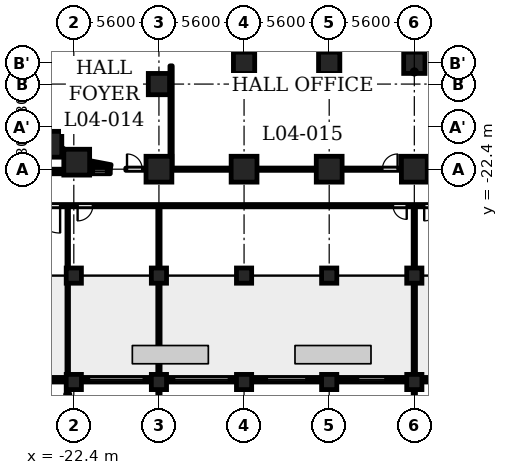
"""IFC4 building model, lengths in metres.
Left out: names, types, materials, properties, quantities, classifications, styles, units other than length and angle.
Written with IfcOpenShell. Run it as: python <this file> out.ifc"""

import sys

from ifc_helpers import new_model, si_unit, direction, frame, frame_2d, origin, origin_2d, place, context, subcontext, project, spatial, polyline, rectangle, circle, outline, extrude, element, fill, save


model = new_model("IFC4")
c1 = context("Model", 3, precision=1e-05, world=origin(), true_north=direction((0.0, 1.0)))
c2 = subcontext(c1, "Body", "Model", "MODEL_VIEW")
j1 = project(units=[si_unit("LENGTHUNIT", "METRE"), si_unit("PLANEANGLEUNIT", "RADIAN")], contexts=[c1])
p1 = place(None, origin())
s1 = spatial("IfcSite", under=j1, at=p1, CompositionType="ELEMENT")
p2 = place(p1, origin())
s2 = spatial("IfcBuilding", under=s1, at=p2, CompositionType="ELEMENT")
p3 = place(p2, frame((0.0, 0.0, 20.9)))
s3 = spatial("IfcBuildingStorey", under=s2, at=p3, CompositionType="ELEMENT", Elevation=20.9)
for number, where, z_axis, x_axis in (
    (1, (-22.209, -21.938, 0.0), (0.0, 0.0, 1.0), (1.0, 0.0, 0.0)),
    (2, (-16.8, -22.4, 0.0), (0.0, 0.0, 1.0), (1.0, 0.0, 0.0)),
    (3, (-11.2, -22.4, 0.0), (0.0, 0.0, 1.0), (1.0, 0.0, 0.0)),
    (4, (-5.6, -22.4, 0.0), (0.0, 0.0, 1.0), (1.0, 0.0, 0.0)),
    (5, (0.0, -22.4, 0.0), (0.0, 0.0, 1.0), (1.0, 0.0, 0.0)),
    (6, (-24.04, -20.76, 0.0), (0.0, 0.0, 1.0), (1.0, 0.0, 0.0)),
):
    element("IfcColumn", number, at=place(p3, frame(where, z_axis=z_axis, x_axis=x_axis)), inside=s3, PredefinedType="COLUMN", context=c2, shape_type="SweptSolid", body=[
        extrude(rectangle(XDim=1.7, YDim=1.7, at=origin_2d()), origin(), (0.0, 0.0, 1.0), 4.8),
    ])
for number, where, z_axis, x_axis in (
    (7, (-16.8, -16.8, 0.0), (0.0, 0.0, 1.0), (1.0, 0.0, 0.0)),
    (8, (-11.2, -15.4, 0.0), (0.0, 0.0, 1.0), (1.0, 0.0, 0.0)),
    (9, (-5.6, -15.4, 0.0), (0.0, 0.0, 1.0), (1.0, 0.0, 0.0)),
    (10, (0.0, -15.4, 0.0), (0.0, 0.0, 1.0), (1.0, 0.0, 0.0)),
):
    element("IfcColumn", number, at=place(p3, frame(where, z_axis=z_axis, x_axis=x_axis)), inside=s3, PredefinedType="COLUMN", context=c2, shape_type="SweptSolid", body=[
        extrude(rectangle(XDim=1.4, YDim=1.4, at=origin_2d()), origin(), (0.0, 0.0, 1.0), 4.8),
    ])
for number, where, z_axis, x_axis in (
    (11, (-22.4, -29.4, 0.0), (0.0, 0.0, 1.0), (1.0, 0.0, 0.0)),
    (12, (-16.8, -29.4, 0.0), (0.0, 0.0, 1.0), (1.0, 0.0, 0.0)),
    (13, (-11.2, -29.4, 0.0), (0.0, 0.0, 1.0), (1.0, 0.0, 0.0)),
    (14, (-5.6, -29.4, 0.0), (0.0, 0.0, 1.0), (1.0, 0.0, 0.0)),
    (15, (0.0, -29.4, 0.0), (0.0, 0.0, 1.0), (1.0, 0.0, 0.0)),
    (16, (-22.4, -36.4, 0.0), (0.0, 0.0, 1.0), (1.0, 0.0, 0.0)),
    (17, (-16.8, -36.4, 0.0), (0.0, 0.0, 1.0), (1.0, 0.0, 0.0)),
    (18, (-11.2, -36.4, 0.0), (0.0, 0.0, 1.0), (1.0, 0.0, 0.0)),
    (19, (-5.6, -36.4, 0.0), (0.0, 0.0, 1.0), (1.0, 0.0, 0.0)),
    (20, (0.0, -36.4, 0.0), (0.0, 0.0, 1.0), (1.0, 0.0, 0.0)),
):
    element("IfcColumn", number, at=place(p3, frame(where, z_axis=z_axis, x_axis=x_axis)), inside=s3, PredefinedType="COLUMN", context=c2, shape_type="SweptSolid", body=[
        extrude(circle(Radius=0.5, at=origin_2d()), origin(), (0.0, 0.0, 1.0), 4.8),
    ])
p4 = place(p3, frame((-23.244, -21.101, 0.0), z_axis=(0.0, 0.0, 1.0), x_axis=(0.827135885329, -0.562001981492, 0.0)))
e21 = element("IfcWall", 21, at=p4, inside=s3, PredefinedType="SOLIDWALL", context=c2, shape_type="SweptSolid", body=[
    extrude(rectangle(XDim=0.477, YDim=0.3, at=frame_2d((0.239, 0.0))), origin(), (0.0, 0.0, 1.0), 4.45),
])
p5 = place(p3, frame((-21.353, -21.989, 0.0), z_axis=(0.0, 0.0, 1.0), x_axis=(0.98229142023, -0.187359455971, 0.0)))
e22 = element("IfcWall", 22, at=p5, inside=s3, PredefinedType="SOLIDWALL", context=c2, shape_type="SweptSolid", body=[
    extrude(rectangle(XDim=1.406, YDim=0.3, at=frame_2d((0.703, 0.0))), origin(), (0.0, 0.0, 1.0), 3.55),
])
p6 = place(p3, frame((-20.0, -22.55, 0.0), z_axis=(0.0, 0.0, 1.0), x_axis=(-1.0, 0.0, 0.0)))
e23 = element("IfcWall", 23, at=p6, inside=s3, PredefinedType="SOLIDWALL", context=c2, shape_type="SweptSolid", body=[
    extrude(rectangle(XDim=1.359, YDim=0.3, at=frame_2d((0.679, 0.0))), origin(), (0.0, 0.0, 1.0), 3.55),
])
p7 = place(p6, frame((0.279, 0.0, 0.6)))
e24 = element("IfcOpeningElement", 24, at=p7, cuts=e23, PredefinedType="OPENING", context=c2, shape_type="SweptSolid", body=[
    extrude(rectangle(XDim=0.8, YDim=1.55, at=frame_2d((0.4, 0.775))), frame((0.0, 0.16, 0.0), z_axis=(0.0, -1.0, 0.0), x_axis=(1.0, 0.0, 0.0)), (0.0, 0.0, 1.0), 0.32),
])
p8 = place(p3, frame((-23.059, -22.55, 0.0), z_axis=(0.0, 0.0, 1.0), x_axis=(-1.0, 0.0, 0.0)))
e25 = element("IfcWall", 25, at=p8, inside=s3, PredefinedType="SOLIDWALL", context=c2, shape_type="SweptSolid", body=[
    extrude(rectangle(XDim=4.441, YDim=0.3, at=frame_2d((2.221, 0.0))), origin(), (0.0, 0.0, 1.0), 4.45),
])
p9 = place(p8, frame((1.621, 0.0, 0.6)))
e26 = element("IfcOpeningElement", 26, at=p9, cuts=e25, PredefinedType="OPENING", context=c2, shape_type="SweptSolid", body=[
    extrude(rectangle(XDim=1.2, YDim=1.55, at=frame_2d((0.6, 0.775))), frame((0.0, 0.16, 0.0), z_axis=(0.0, -1.0, 0.0), x_axis=(1.0, 0.0, 0.0)), (0.0, 0.0, 1.0), 0.32),
])
p10 = place(p3, frame((-27.5, -36.25, 0.0), z_axis=(0.0, 0.0, 1.0), x_axis=(1.0, 0.0, 0.0)))
e27 = element("IfcWall", 27, at=p10, inside=s3, PredefinedType="SOLIDWALL", context=c2, shape_type="SweptSolid", body=[
    extrude(rectangle(XDim=4.6, YDim=0.3, at=frame_2d((2.3, 0.0))), origin(), (0.0, 0.0, 1.0), 3.65),
])
p11 = place(p10, frame((1.0, 0.0, 0.9)))
e28 = element("IfcOpeningElement", 28, at=p11, cuts=e27, PredefinedType="OPENING", context=c2, shape_type="SweptSolid", body=[
    extrude(rectangle(XDim=2.6, YDim=1.25, at=frame_2d((1.3, 0.625))), frame((0.0, 0.16, 0.0), z_axis=(0.0, -1.0, 0.0), x_axis=(1.0, 0.0, 0.0)), (0.0, 0.0, 1.0), 0.32),
])
p12 = place(p3, frame((-21.9, -36.25, 0.0), z_axis=(0.0, 0.0, 1.0), x_axis=(1.0, 0.0, 0.0)))
e29 = element("IfcWall", 29, at=p12, inside=s3, PredefinedType="SOLIDWALL", context=c2, shape_type="SweptSolid", body=[
    extrude(rectangle(XDim=4.6, YDim=0.3, at=frame_2d((2.3, 0.0))), origin(), (0.0, 0.0, 1.0), 3.65),
])
p13 = place(p12, frame((0.5, 0.0, 1.2)))
e30 = element("IfcOpeningElement", 30, at=p13, cuts=e29, PredefinedType="OPENING", context=c2, shape_type="SweptSolid", body=[
    extrude(rectangle(XDim=3.6, YDim=0.95, at=frame_2d((1.8, 0.475))), frame((0.0, 0.16, 0.0), z_axis=(0.0, -1.0, 0.0), x_axis=(1.0, 0.0, 0.0)), (0.0, 0.0, 1.0), 0.32),
])
p14 = place(p3, frame((-16.3, -36.25, 0.0), z_axis=(0.0, 0.0, 1.0), x_axis=(1.0, 0.0, 0.0)))
e31 = element("IfcWall", 31, at=p14, inside=s3, PredefinedType="SOLIDWALL", context=c2, shape_type="SweptSolid", body=[
    extrude(rectangle(XDim=4.6, YDim=0.3, at=frame_2d((2.3, 0.0))), origin(), (0.0, 0.0, 1.0), 3.65),
])
p15 = place(p14, frame((0.5, 0.0, 1.2)))
e32 = element("IfcOpeningElement", 32, at=p15, cuts=e31, PredefinedType="OPENING", context=c2, shape_type="SweptSolid", body=[
    extrude(rectangle(XDim=3.6, YDim=0.95, at=frame_2d((1.8, 0.475))), frame((0.0, 0.16, 0.0), z_axis=(0.0, -1.0, 0.0), x_axis=(1.0, 0.0, 0.0)), (0.0, 0.0, 1.0), 0.32),
])
p16 = place(p3, frame((-10.7, -36.25, 0.0), z_axis=(0.0, 0.0, 1.0), x_axis=(1.0, 0.0, 0.0)))
e33 = element("IfcWall", 33, at=p16, inside=s3, PredefinedType="SOLIDWALL", context=c2, shape_type="SweptSolid", body=[
    extrude(rectangle(XDim=4.6, YDim=0.3, at=frame_2d((2.3, 0.0))), origin(), (0.0, 0.0, 1.0), 3.65),
])
p17 = place(p16, frame((1.0, 0.0, 0.9)))
e34 = element("IfcOpeningElement", 34, at=p17, cuts=e33, PredefinedType="OPENING", context=c2, shape_type="SweptSolid", body=[
    extrude(rectangle(XDim=2.6, YDim=1.25, at=frame_2d((1.3, 0.625))), frame((0.0, 0.16, 0.0), z_axis=(0.0, -1.0, 0.0), x_axis=(1.0, 0.0, 0.0)), (0.0, 0.0, 1.0), 0.32),
])
p18 = place(p3, frame((-5.1, -36.25, 0.0), z_axis=(0.0, 0.0, 1.0), x_axis=(1.0, 0.0, 0.0)))
e35 = element("IfcWall", 35, at=p18, inside=s3, PredefinedType="SOLIDWALL", context=c2, shape_type="SweptSolid", body=[
    extrude(rectangle(XDim=4.6, YDim=0.3, at=frame_2d((2.3, 0.0))), origin(), (0.0, 0.0, 1.0), 3.65),
])
p19 = place(p18, frame((1.4, 0.0, 0.9)))
e36 = element("IfcOpeningElement", 36, at=p19, cuts=e35, PredefinedType="OPENING", context=c2, shape_type="SweptSolid", body=[
    extrude(rectangle(XDim=1.8, YDim=1.25, at=frame_2d((0.9, 0.625))), frame((0.0, 0.16, 0.0), z_axis=(0.0, -1.0, 0.0), x_axis=(1.0, 0.0, 0.0)), (0.0, 0.0, 1.0), 0.32),
])
p20 = place(p3, frame((0.5, -36.25, 0.0), z_axis=(0.0, 0.0, 1.0), x_axis=(1.0, 0.0, 0.0)))
e37 = element("IfcWall", 37, at=p20, inside=s3, PredefinedType="SOLIDWALL", context=c2, shape_type="SweptSolid", body=[
    extrude(rectangle(XDim=4.6, YDim=0.3, at=frame_2d((2.3, 0.0))), origin(), (0.0, 0.0, 1.0), 3.65),
])
p21 = place(p20, frame((1.0, 0.0, 0.9)))
e38 = element("IfcOpeningElement", 38, at=p21, cuts=e37, PredefinedType="OPENING", context=c2, shape_type="SweptSolid", body=[
    extrude(rectangle(XDim=2.6, YDim=1.25, at=frame_2d((1.3, 0.625))), frame((0.0, 0.16, 0.0), z_axis=(0.0, -1.0, 0.0), x_axis=(1.0, 0.0, 0.0)), (0.0, 0.0, 1.0), 0.32),
])
p22 = place(p3, frame((-37.0, -24.8, 0.0), z_axis=(0.0, 0.0, 1.0), x_axis=(1.0, 0.0, 0.0)))
e39 = element("IfcWall", 39, at=p22, inside=s3, PredefinedType="PARTITIONING", context=c2, shape_type="SweptSolid", body=[
    extrude(rectangle(XDim=74.0, YDim=0.15, at=frame_2d((37.0, 0.0))), origin(), (0.0, 0.0, 1.0), 4.45),
])
p23 = place(p22, frame((11.9, 0.0, 0.0)))
e40 = element("IfcOpeningElement", 40, at=p23, cuts=e39, PredefinedType="OPENING", context=c2, shape_type="SweptSolid", body=[
    extrude(rectangle(XDim=1.8, YDim=2.1, at=frame_2d((0.9, 1.05))), frame((0.0, 0.085, 0.0), z_axis=(0.0, -1.0, 0.0), x_axis=(1.0, 0.0, 0.0)), (0.0, 0.0, 1.0), 0.17),
])
p24 = place(p22, frame((14.85, 0.0, 0.0)))
e41 = element("IfcOpeningElement", 41, at=p24, cuts=e39, PredefinedType="OPENING", context=c2, shape_type="SweptSolid", body=[
    extrude(rectangle(XDim=1.0, YDim=2.1, at=frame_2d((0.5, 1.05))), frame((0.0, 0.085, 0.0), z_axis=(0.0, -1.0, 0.0), x_axis=(1.0, 0.0, 0.0)), (0.0, 0.0, 1.0), 0.17),
])
p25 = place(p22, frame((35.6, 0.0, 0.0)))
e42 = element("IfcOpeningElement", 42, at=p25, cuts=e39, PredefinedType="OPENING", context=c2, shape_type="SweptSolid", body=[
    extrude(rectangle(XDim=0.9, YDim=2.1, at=frame_2d((0.45, 1.05))), frame((0.0, 0.085, 0.0), z_axis=(0.0, -1.0, 0.0), x_axis=(1.0, 0.0, 0.0)), (0.0, 0.0, 1.0), 0.17),
])
p26 = place(p22, frame((37.65, 0.0, 0.0)))
e43 = element("IfcOpeningElement", 43, at=p26, cuts=e39, PredefinedType="OPENING", context=c2, shape_type="SweptSolid", body=[
    extrude(rectangle(XDim=1.0, YDim=2.1, at=frame_2d((0.5, 1.05))), frame((0.0, 0.085, 0.0), z_axis=(0.0, -1.0, 0.0), x_axis=(1.0, 0.0, 0.0)), (0.0, 0.0, 1.0), 0.17),
])
p27 = place(p22, frame((59.4, 0.0, 0.0)))
e44 = element("IfcOpeningElement", 44, at=p27, cuts=e39, PredefinedType="OPENING", context=c2, shape_type="SweptSolid", body=[
    extrude(rectangle(XDim=1.0, YDim=2.1, at=frame_2d((0.5, 1.05))), frame((0.0, 0.085, 0.0), z_axis=(0.0, -1.0, 0.0), x_axis=(1.0, 0.0, 0.0)), (0.0, 0.0, 1.0), 0.17),
])
p28 = place(p22, frame((61.65, 0.0, 0.0)))
e45 = element("IfcOpeningElement", 45, at=p28, cuts=e39, PredefinedType="OPENING", context=c2, shape_type="SweptSolid", body=[
    extrude(rectangle(XDim=1.0, YDim=2.1, at=frame_2d((0.5, 1.05))), frame((0.0, 0.085, 0.0), z_axis=(0.0, -1.0, 0.0), x_axis=(1.0, 0.0, 0.0)), (0.0, 0.0, 1.0), 0.17),
])
p29 = place(p3, frame((-18.98, -22.4, 0.0), z_axis=(0.0, 0.0, 1.0), x_axis=(1.0, 0.0, 0.0)))
e46 = element("IfcWall", 46, at=p29, inside=s3, PredefinedType="PARTITIONING", context=c2, shape_type="SweptSolid", body=[
    extrude(rectangle(XDim=38.211, YDim=0.15, at=frame_2d((19.105, 0.0))), origin(), (0.0, 0.0, 1.0), 3.55),
])
p30 = place(p29, frame((21.18, 0.0, 0.0)))
e47 = element("IfcOpeningElement", 47, at=p30, cuts=e46, PredefinedType="OPENING", context=c2, shape_type="SweptSolid", body=[
    extrude(rectangle(XDim=1.2, YDim=2.1, at=frame_2d((0.6, 1.05))), frame((0.0, 0.085, 0.0), z_axis=(0.0, -1.0, 0.0), x_axis=(1.0, 0.0, 0.0)), (0.0, 0.0, 1.0), 0.17),
])
p31 = place(p29, frame((0.08, 0.0, 0.0)))
e48 = element("IfcOpeningElement", 48, at=p31, cuts=e46, PredefinedType="OPENING", context=c2, shape_type="SweptSolid", body=[
    extrude(rectangle(XDim=1.0, YDim=2.1, at=frame_2d((0.5, 1.05))), frame((0.0, 0.085, 0.0), z_axis=(0.0, -1.0, 0.0), x_axis=(1.0, 0.0, 0.0)), (0.0, 0.0, 1.0), 0.17),
])
p32 = place(p29, frame((16.88, 0.0, 0.0)))
e49 = element("IfcOpeningElement", 49, at=p32, cuts=e46, PredefinedType="OPENING", context=c2, shape_type="SweptSolid", body=[
    extrude(rectangle(XDim=1.0, YDim=2.1, at=frame_2d((0.5, 1.05))), frame((0.0, 0.085, 0.0), z_axis=(0.0, -1.0, 0.0), x_axis=(1.0, 0.0, 0.0)), (0.0, 0.0, 1.0), 0.17),
])
p33 = place(p29, frame((25.68, 0.0, 0.0)))
e50 = element("IfcOpeningElement", 50, at=p33, cuts=e46, PredefinedType="OPENING", context=c2, shape_type="SweptSolid", body=[
    extrude(rectangle(XDim=0.9, YDim=2.1, at=frame_2d((0.45, 1.05))), frame((0.0, 0.085, 0.0), z_axis=(0.0, -1.0, 0.0), x_axis=(1.0, 0.0, 0.0)), (0.0, 0.0, 1.0), 0.17),
])
p34 = place(p29, frame((31.18, 0.0, 0.0)))
e51 = element("IfcOpeningElement", 51, at=p34, cuts=e46, PredefinedType="OPENING", context=c2, shape_type="SweptSolid", body=[
    extrude(rectangle(XDim=0.9, YDim=2.1, at=frame_2d((0.45, 1.05))), frame((0.0, 0.085, 0.0), z_axis=(0.0, -1.0, 0.0), x_axis=(1.0, 0.0, 0.0)), (0.0, 0.0, 1.0), 0.17),
])
p35 = place(p29, frame((33.13, 0.0, 0.0)))
e52 = element("IfcOpeningElement", 52, at=p35, cuts=e46, PredefinedType="OPENING", context=c2, shape_type="SweptSolid", body=[
    extrude(rectangle(XDim=0.9, YDim=2.1, at=frame_2d((0.45, 1.05))), frame((0.0, 0.085, 0.0), z_axis=(0.0, -1.0, 0.0), x_axis=(1.0, 0.0, 0.0)), (0.0, 0.0, 1.0), 0.17),
])
p36 = place(p29, frame((37.231, 0.0, 0.0)))
e53 = element("IfcOpeningElement", 53, at=p36, cuts=e46, PredefinedType="OPENING", context=c2, shape_type="SweptSolid", body=[
    extrude(rectangle(XDim=0.9, YDim=2.1, at=frame_2d((0.45, 1.05))), frame((0.0, 0.085, 0.0), z_axis=(0.0, -1.0, 0.0), x_axis=(1.0, 0.0, 0.0)), (0.0, 0.0, 1.0), 0.17),
])
p37 = place(p3, frame((-22.8, -37.23, 0.0), z_axis=(0.0, 0.0, 1.0), x_axis=(0.0, 1.0, 0.0)))
e54 = element("IfcWall", 54, at=p37, inside=s3, PredefinedType="PARTITIONING", context=c2, shape_type="SweptSolid", body=[
    extrude(rectangle(XDim=12.355, YDim=0.1, at=frame_2d((6.177, 0.0))), origin(), (0.0, 0.0, 1.0), 4.45),
])
p38 = place(p3, frame((-16.8, -37.23, 0.0), z_axis=(0.0, 0.0, 1.0), x_axis=(0.0, 1.0, 0.0)))
e55 = element("IfcWall", 55, at=p38, inside=s3, PredefinedType="PARTITIONING", context=c2, shape_type="SweptSolid", body=[
    extrude(rectangle(XDim=12.355, YDim=0.15, at=frame_2d((6.177, 0.0))), origin(), (0.0, 0.0, 1.0), 4.45),
])
p39 = place(p3, frame((-16.0, -22.325, 0.0), z_axis=(0.0, 0.0, 1.0), x_axis=(0.0, 1.0, 0.0)))
e56 = element("IfcWall", 56, at=p39, inside=s3, PredefinedType="PARTITIONING", context=c2, shape_type="SweptSolid", body=[
    extrude(rectangle(XDim=6.725, YDim=0.15, at=frame_2d((3.362, 0.0))), origin(), (0.0, 0.0, 1.0), 4.45),
])
p40 = place(p3, frame((0.0, -37.23, 0.0), z_axis=(0.0, 0.0, 1.0), x_axis=(0.0, 1.0, 0.0)))
e57 = element("IfcWall", 57, at=p40, inside=s3, PredefinedType="PARTITIONING", context=c2, shape_type="SweptSolid", body=[
    extrude(rectangle(XDim=12.355, YDim=0.15, at=frame_2d((6.177, 0.0))), origin(), (0.0, 0.0, 1.0), 4.45),
])
p41 = place(p3, origin())
e58 = element("IfcWall", 58, at=p41, inside=s3, PredefinedType="SOLIDWALL", context=c2, shape_type="SweptSolid", body=[
    extrude(outline(polyline([(-20.0, -22.7), (-19.0, -22.7), (-19.0, -22.285), (-19.944, -22.105), (-20.0, -22.4), (-20.0, -22.7)])), origin(), (0.0, 0.0, 1.0), 3.55),
])
p42 = place(p23, origin())
e59 = element("IfcDoor", 59, at=p42, inside=s3, OperationType="SINGLE_SWING_RIGHT", PredefinedType="DOOR", context=c2, shape_type="SweptSolid", body=[
    extrude(rectangle(XDim=1.8, YDim=2.1, at=frame_2d((0.9, 1.05))), frame((0.0, 0.025, 0.0), z_axis=(0.0, -1.0, 0.0), x_axis=(1.0, 0.0, 0.0)), (0.0, 0.0, 1.0), 0.05),
])
fill(e40, e59)
p43 = place(p24, origin())
e60 = element("IfcDoor", 60, at=p43, inside=s3, OperationType="SINGLE_SWING_LEFT", PredefinedType="DOOR", context=c2, shape_type="SweptSolid", body=[
    extrude(rectangle(XDim=1.0, YDim=2.1, at=frame_2d((0.5, 1.05))), frame((0.0, 0.025, 0.0), z_axis=(0.0, -1.0, 0.0), x_axis=(1.0, 0.0, 0.0)), (0.0, 0.0, 1.0), 0.05),
])
fill(e41, e60)
p44 = place(p25, origin())
e61 = element("IfcDoor", 61, at=p44, inside=s3, OperationType="SINGLE_SWING_RIGHT", PredefinedType="DOOR", context=c2, shape_type="SweptSolid", body=[
    extrude(rectangle(XDim=0.9, YDim=2.1, at=frame_2d((0.45, 1.05))), frame((0.0, 0.025, 0.0), z_axis=(0.0, -1.0, 0.0), x_axis=(1.0, 0.0, 0.0)), (0.0, 0.0, 1.0), 0.05),
])
fill(e42, e61)
p45 = place(p26, origin())
e62 = element("IfcDoor", 62, at=p45, inside=s3, OperationType="SINGLE_SWING_LEFT", PredefinedType="DOOR", context=c2, shape_type="SweptSolid", body=[
    extrude(rectangle(XDim=1.0, YDim=2.1, at=frame_2d((0.5, 1.05))), frame((0.0, 0.025, 0.0), z_axis=(0.0, -1.0, 0.0), x_axis=(1.0, 0.0, 0.0)), (0.0, 0.0, 1.0), 0.05),
])
fill(e43, e62)
p46 = place(p31, origin())
e63 = element("IfcDoor", 63, at=p46, inside=s3, OperationType="SINGLE_SWING_RIGHT", PredefinedType="DOOR", context=c2, shape_type="SweptSolid", body=[
    extrude(rectangle(XDim=1.0, YDim=2.1, at=frame_2d((0.5, 1.05))), frame((0.0, 0.025, 0.0), z_axis=(0.0, -1.0, 0.0), x_axis=(1.0, 0.0, 0.0)), (0.0, 0.0, 1.0), 0.05),
])
fill(e48, e63)
p47 = place(p32, origin())
e64 = element("IfcDoor", 64, at=p47, inside=s3, OperationType="SINGLE_SWING_LEFT", PredefinedType="DOOR", context=c2, shape_type="SweptSolid", body=[
    extrude(rectangle(XDim=1.0, YDim=2.1, at=frame_2d((0.5, 1.05))), frame((0.0, 0.025, 0.0), z_axis=(0.0, -1.0, 0.0), x_axis=(1.0, 0.0, 0.0)), (0.0, 0.0, 1.0), 0.05),
])
fill(e49, e64)
p48 = place(p7, origin())
e65 = element("IfcWindow", 65, at=p48, inside=s3, PartitioningType="SINGLE_PANEL", PredefinedType="WINDOW", context=c2, shape_type="SweptSolid", body=[
    extrude(rectangle(XDim=0.8, YDim=1.55, at=frame_2d((0.4, 0.775))), frame((0.0, 0.03, 0.0), z_axis=(0.0, -1.0, 0.0), x_axis=(1.0, 0.0, 0.0)), (0.0, 0.0, 1.0), 0.06),
])
fill(e24, e65)
p49 = place(p13, origin())
e66 = element("IfcWindow", 66, at=p49, inside=s3, PartitioningType="SINGLE_PANEL", PredefinedType="WINDOW", context=c2, shape_type="SweptSolid", body=[
    extrude(rectangle(XDim=3.6, YDim=0.95, at=frame_2d((1.8, 0.475))), frame((0.0, 0.03, 0.0), z_axis=(0.0, -1.0, 0.0), x_axis=(1.0, 0.0, 0.0)), (0.0, 0.0, 1.0), 0.06),
])
fill(e30, e66)
p50 = place(p15, origin())
e67 = element("IfcWindow", 67, at=p50, inside=s3, PartitioningType="SINGLE_PANEL", PredefinedType="WINDOW", context=c2, shape_type="SweptSolid", body=[
    extrude(rectangle(XDim=3.6, YDim=0.95, at=frame_2d((1.8, 0.475))), frame((0.0, 0.03, 0.0), z_axis=(0.0, -1.0, 0.0), x_axis=(1.0, 0.0, 0.0)), (0.0, 0.0, 1.0), 0.06),
])
fill(e32, e67)
p51 = place(p17, origin())
e68 = element("IfcWindow", 68, at=p51, inside=s3, PartitioningType="SINGLE_PANEL", PredefinedType="WINDOW", context=c2, shape_type="SweptSolid", body=[
    extrude(rectangle(XDim=2.6, YDim=1.25, at=frame_2d((1.3, 0.625))), frame((0.0, 0.03, 0.0), z_axis=(0.0, -1.0, 0.0), x_axis=(1.0, 0.0, 0.0)), (0.0, 0.0, 1.0), 0.06),
])
fill(e34, e68)
p52 = place(p19, origin())
e69 = element("IfcWindow", 69, at=p52, inside=s3, PartitioningType="SINGLE_PANEL", PredefinedType="WINDOW", context=c2, shape_type="SweptSolid", body=[
    extrude(rectangle(XDim=1.8, YDim=1.25, at=frame_2d((0.9, 0.625))), frame((0.0, 0.03, 0.0), z_axis=(0.0, -1.0, 0.0), x_axis=(1.0, 0.0, 0.0)), (0.0, 0.0, 1.0), 0.06),
])
fill(e36, e69)
save(model, sys.argv[1])
